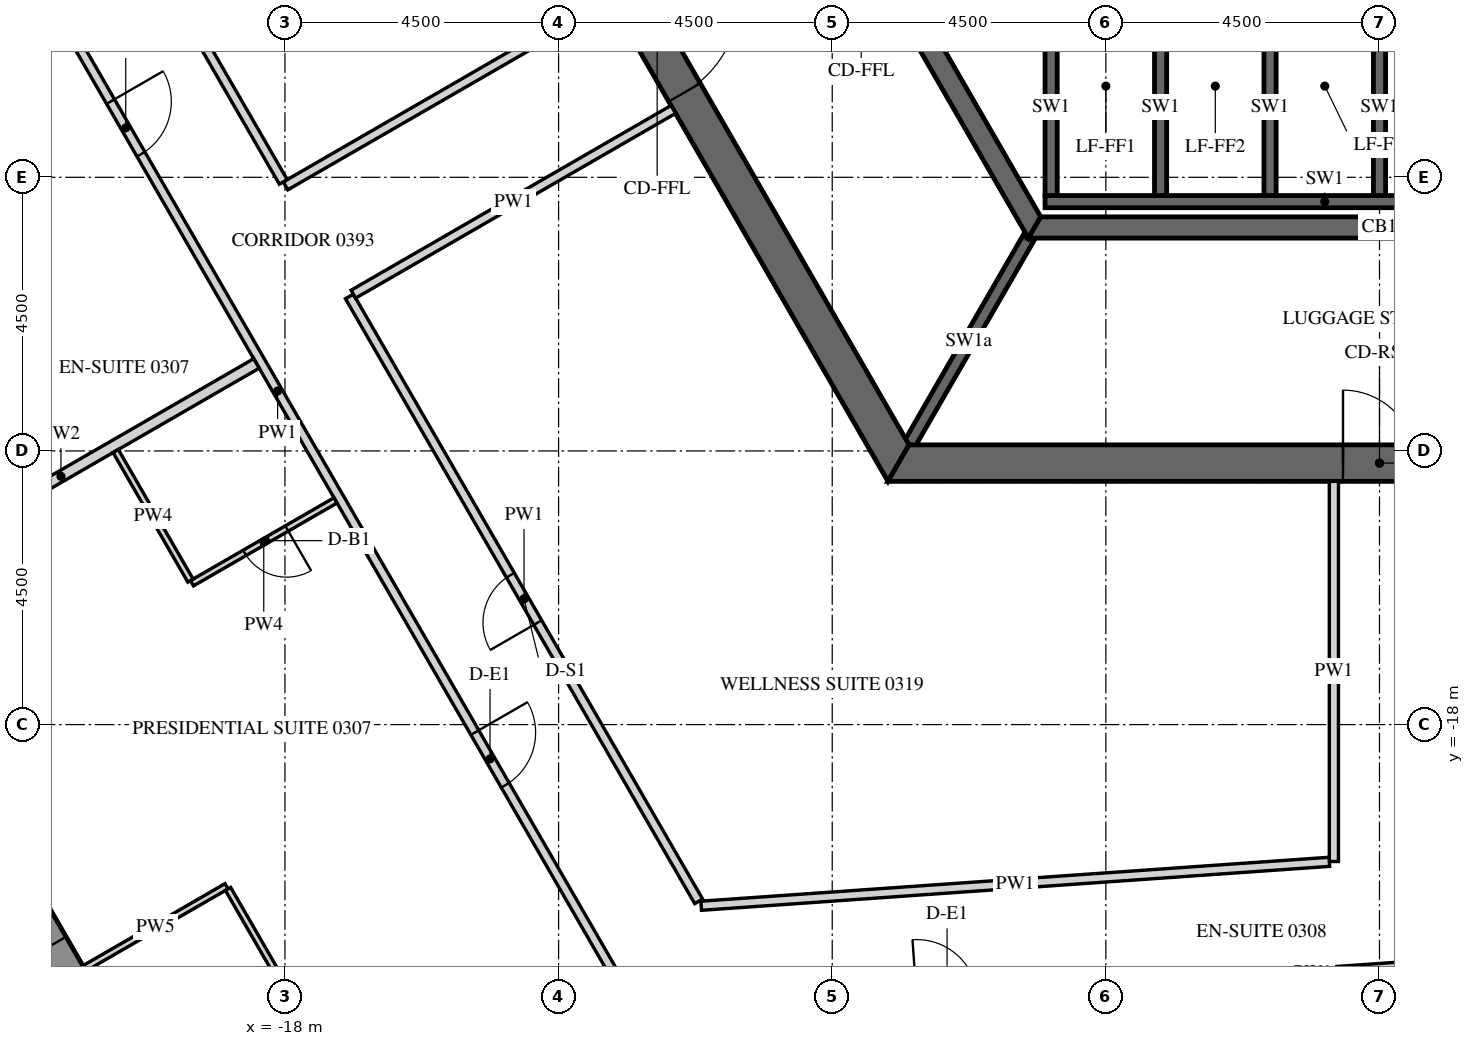
"""IFC4 building model, lengths in metres.
Left out: names, types, materials, properties, quantities, classifications, styles, units other than length and angle.
Written with IfcOpenShell. Run it as: python <this file> out.ifc"""

import sys

from ifc_helpers import new_model, si_unit, direction, frame, frame_2d, origin, place, context, subcontext, project, spatial, polyline, rectangle, outline, extrude, element, fill, save


model = new_model("IFC4")
c1 = context("Model", 3, precision=1e-05, world=origin(), true_north=direction((0.0, 1.0)))
c2 = subcontext(c1, "Body", "Model", "MODEL_VIEW")
j1 = project(units=[si_unit("LENGTHUNIT", "METRE"), si_unit("PLANEANGLEUNIT", "RADIAN")], contexts=[c1])
p1 = place(None, origin())
s1 = spatial("IfcSite", under=j1, at=p1, CompositionType="ELEMENT")
p2 = place(p1, origin())
s2 = spatial("IfcBuilding", under=s1, at=p2, CompositionType="ELEMENT")
p3 = place(p2, frame((0.0, 0.0, 60.9)))
s3 = spatial("IfcBuildingStorey", under=s2, at=p3, CompositionType="ELEMENT", Elevation=60.9)
p4 = place(p3, frame((-32.655, -2.89, -0.15), z_axis=(0.0, 0.0, 1.0), x_axis=(0.499997711317, -0.866026725152, 0.0)))
e1 = element("IfcWall", 1, at=p4, inside=s3, PredefinedType="SOLIDWALL", context=c2, shape_type="SweptSolid", body=[
    extrude(outline(polyline([(-0.022, -0.275), (30.097, -0.275), (30.045, 0.275), (0.022, 0.275), (-0.022, -0.275)])), origin(), (0.0, 0.0, 1.0), 3.9),
])
p5 = place(p4, frame((1.236, 0.0, 1.05)))
e2 = element("IfcOpeningElement", 2, at=p5, cuts=e1, PredefinedType="OPENING", context=c2, shape_type="SweptSolid", body=[
    extrude(rectangle(XDim=2.4, YDim=2.4, at=frame_2d((1.2, 1.2))), frame((0.0, 0.285, 0.0), z_axis=(0.0, -1.0, 0.0), x_axis=(1.0, 0.0, 0.0)), (0.0, 0.0, 1.0), 0.57),
])
p6 = place(p4, frame((4.835, 0.0, 1.05)))
e3 = element("IfcOpeningElement", 3, at=p6, cuts=e1, PredefinedType="OPENING", context=c2, shape_type="SweptSolid", body=[
    extrude(rectangle(XDim=2.4, YDim=2.4, at=frame_2d((1.2, 1.2))), frame((0.0, 0.285, 0.0), z_axis=(0.0, -1.0, 0.0), x_axis=(1.0, 0.0, 0.0)), (0.0, 0.0, 1.0), 0.57),
])
p7 = place(p4, frame((8.436, 0.0, 1.05)))
e4 = element("IfcOpeningElement", 4, at=p7, cuts=e1, PredefinedType="OPENING", context=c2, shape_type="SweptSolid", body=[
    extrude(rectangle(XDim=2.4, YDim=2.4, at=frame_2d((1.2, 1.2))), frame((0.0, 0.285, 0.0), z_axis=(0.0, -1.0, 0.0), x_axis=(1.0, 0.0, 0.0)), (0.0, 0.0, 1.0), 0.57),
])
p8 = place(p4, frame((12.035, 0.0, 1.05)))
e5 = element("IfcOpeningElement", 5, at=p8, cuts=e1, PredefinedType="OPENING", context=c2, shape_type="SweptSolid", body=[
    extrude(rectangle(XDim=2.4, YDim=2.4, at=frame_2d((1.2, 1.2))), frame((0.0, 0.285, 0.0), z_axis=(0.0, -1.0, 0.0), x_axis=(1.0, 0.0, 0.0)), (0.0, 0.0, 1.0), 0.57),
])
p9 = place(p4, frame((15.635, 0.0, 1.05)))
e6 = element("IfcOpeningElement", 6, at=p9, cuts=e1, PredefinedType="OPENING", context=c2, shape_type="SweptSolid", body=[
    extrude(rectangle(XDim=2.4, YDim=2.4, at=frame_2d((1.2, 1.2))), frame((0.0, 0.285, 0.0), z_axis=(0.0, -1.0, 0.0), x_axis=(1.0, 0.0, 0.0)), (0.0, 0.0, 1.0), 0.57),
])
p10 = place(p4, frame((19.236, 0.0, 1.05)))
e7 = element("IfcOpeningElement", 7, at=p10, cuts=e1, PredefinedType="OPENING", context=c2, shape_type="SweptSolid", body=[
    extrude(rectangle(XDim=2.4, YDim=2.4, at=frame_2d((1.2, 1.2))), frame((0.0, 0.285, 0.0), z_axis=(0.0, -1.0, 0.0), x_axis=(1.0, 0.0, 0.0)), (0.0, 0.0, 1.0), 0.57),
])
p11 = place(p4, frame((22.835, 0.0, 1.05)))
e8 = element("IfcOpeningElement", 8, at=p11, cuts=e1, PredefinedType="OPENING", context=c2, shape_type="SweptSolid", body=[
    extrude(rectangle(XDim=2.4, YDim=2.4, at=frame_2d((1.2, 1.2))), frame((0.0, 0.285, 0.0), z_axis=(0.0, -1.0, 0.0), x_axis=(1.0, 0.0, 0.0)), (0.0, 0.0, 1.0), 0.57),
])
p12 = place(p4, frame((26.436, 0.0, 1.05)))
e9 = element("IfcOpeningElement", 9, at=p12, cuts=e1, PredefinedType="OPENING", context=c2, shape_type="SweptSolid", body=[
    extrude(rectangle(XDim=2.4, YDim=2.4, at=frame_2d((1.2, 1.2))), frame((0.0, 0.285, 0.0), z_axis=(0.0, -1.0, 0.0), x_axis=(1.0, 0.0, 0.0)), (0.0, 0.0, 1.0), 0.57),
])
p13 = place(p3, frame((-15.819, 0.0, -0.15), z_axis=(0.0, 0.0, 1.0), x_axis=(0.499999880136, -0.866025472988, 0.0)))
e10 = element("IfcWall", 10, at=p13, inside=s3, PredefinedType="SHEAR", context=c2, shape_type="SweptSolid", body=[
    extrude(outline(polyline([(-0.173, -0.3), (15.993, -0.3), (15.646, 0.3), (0.173, 0.3), (-0.173, -0.3)])), origin(), (0.0, 0.0, 1.0), 3.9),
])
p14 = place(p13, frame((6.981, 0.0, 0.15)))
e11 = element("IfcOpeningElement", 11, at=p14, cuts=e10, PredefinedType="OPENING", context=c2, shape_type="SweptSolid", body=[
    extrude(rectangle(XDim=1.8, YDim=2.4, at=frame_2d((0.9, 1.2))), frame((0.0, 0.31, 0.0), z_axis=(0.0, -1.0, 0.0), x_axis=(1.0, 0.0, 0.0)), (0.0, 0.0, 1.0), 0.62),
])
p15 = place(p3, frame((-7.91, -13.7, -0.15), z_axis=(0.0, 0.0, 1.0), x_axis=(1.0, 0.0, 0.0)))
e12 = element("IfcWall", 12, at=p15, inside=s3, PredefinedType="SHEAR", context=c2, shape_type="SweptSolid", body=[
    extrude(outline(polyline([(-0.173, -0.3), (15.993, -0.3), (15.646, 0.3), (0.173, 0.3), (-0.173, -0.3)])), origin(), (0.0, 0.0, 1.0), 3.9),
])
p16 = place(p15, frame((7.31, 0.0, 0.15)))
e13 = element("IfcOpeningElement", 13, at=p16, cuts=e12, PredefinedType="OPENING", context=c2, shape_type="SweptSolid", body=[
    extrude(rectangle(XDim=1.2, YDim=2.4, at=frame_2d((0.6, 1.2))), frame((0.0, 0.31, 0.0), z_axis=(0.0, -1.0, 0.0), x_axis=(1.0, 0.0, 0.0)), (0.0, 0.0, 1.0), 0.62),
])
p17 = place(p3, frame((-11.345, 0.0, -0.15), z_axis=(0.0, 0.0, 1.0), x_axis=(0.499995046907, -0.866028263435, 0.0)))
e14 = element("IfcWall", 14, at=p17, inside=s3, PredefinedType="SHEAR", context=c2, shape_type="SweptSolid", body=[
    extrude(outline(polyline([(-0.101, -0.175), (11.446, -0.175), (11.244, 0.175), (0.101, 0.175), (-0.101, -0.175)])), origin(), (0.0, 0.0, 1.0), 3.9),
])
p18 = place(p17, frame((4.744, 0.0, 0.15)))
e15 = element("IfcOpeningElement", 15, at=p18, cuts=e14, PredefinedType="OPENING", context=c2, shape_type="SweptSolid", body=[
    extrude(rectangle(XDim=1.8, YDim=2.4, at=frame_2d((0.9, 1.2))), frame((0.0, 0.185, 0.0), z_axis=(0.0, -1.0, 0.0), x_axis=(1.0, 0.0, 0.0)), (0.0, 0.0, 1.0), 0.37),
])
p19 = place(p3, frame((-5.673, -9.825, -0.15), z_axis=(0.0, 0.0, 1.0), x_axis=(1.0, 0.0, 0.0)))
e16 = element("IfcWall", 16, at=p19, inside=s3, PredefinedType="SHEAR", context=c2, shape_type="SweptSolid", body=[
    extrude(outline(polyline([(-0.101, -0.175), (11.446, -0.175), (11.244, 0.175), (0.101, 0.175), (-0.101, -0.175)])), origin(), (0.0, 0.0, 1.0), 3.9),
])
p20 = place(p3, frame((-5.5, -9.4, -0.25), z_axis=(0.0, 0.0, 1.0), x_axis=(1.0, 0.0, 0.0)))
e17 = element("IfcWall", 17, at=p20, inside=s3, PredefinedType="SHEAR", context=c2, shape_type="SweptSolid", body=[
    extrude(rectangle(XDim=9.2, YDim=0.2, at=frame_2d((4.6, 0.0))), origin(), (0.0, 0.0, 1.0), 3.9),
])
for number, where, z_axis, x_axis in (
    (18, (-5.4, -9.3, -0.25), (0.0, 0.0, 1.0), (0.0, 1.0, 0.0)),
    (19, (-3.6, -9.3, -0.25), (0.0, 0.0, 1.0), (0.0, 1.0, 0.0)),
    (20, (-1.8, -9.3, -0.25), (0.0, 0.0, 1.0), (0.0, 1.0, 0.0)),
    (21, (0.0, -9.3, -0.25), (0.0, 0.0, 1.0), (0.0, 1.0, 0.0)),
):
    element("IfcWall", number, at=place(p3, frame(where, z_axis=z_axis, x_axis=x_axis)), inside=s3, PredefinedType="SHEAR", context=c2, shape_type="SweptSolid", body=[
        extrude(rectangle(XDim=2.9, YDim=0.2, at=frame_2d((1.45, 0.0))), origin(), (0.0, 0.0, 1.0), 3.9),
    ])
p21 = place(p3, frame((-5.773, -10.0, -0.15), z_axis=(0.0, 0.0, 1.0), x_axis=(-0.500038251005, -0.86600331843, 0.0)))
e22 = element("IfcWall", 22, at=p21, inside=s3, PredefinedType="SHEAR", context=c2, shape_type="SweptSolid", body=[
    extrude(rectangle(XDim=3.926, YDim=0.2, at=frame_2d((1.963, 0.0))), origin(), (0.0, 0.0, 1.0), 3.9),
])
p22 = place(p3, frame((-24.09, -2.175, 0.0), z_axis=(0.0, 0.0, 1.0), x_axis=(0.499996832073, -0.86602723278, 0.0)))
e23 = element("IfcWall", 23, at=p22, inside=s3, PredefinedType="PARTITIONING", context=c2, shape_type="SweptSolid", body=[
    extrude(rectangle(XDim=23.877, YDim=0.15, at=frame_2d((11.938, 0.0))), origin(), (0.0, 0.0, 1.0), 2.988),
])
p23 = place(p22, frame((6.443, 0.0, 0.0)))
e24 = element("IfcOpeningElement", 24, at=p23, cuts=e23, PredefinedType="OPENING", context=c2, shape_type="SweptSolid", body=[
    extrude(rectangle(XDim=1.0, YDim=2.1, at=frame_2d((0.5, 1.05))), frame((0.0, 0.085, 0.0), z_axis=(0.0, -1.0, 0.0), x_axis=(1.0, 0.0, 0.0)), (0.0, 0.0, 1.0), 0.17),
])
p24 = place(p22, frame((18.425, 0.0, 0.0)))
e25 = element("IfcOpeningElement", 25, at=p24, cuts=e23, PredefinedType="OPENING", context=c2, shape_type="SweptSolid", body=[
    extrude(rectangle(XDim=1.0, YDim=2.1, at=frame_2d((0.5, 1.05))), frame((0.0, 0.085, 0.0), z_axis=(0.0, -1.0, 0.0), x_axis=(1.0, 0.0, 0.0)), (0.0, 0.0, 1.0), 0.17),
])
p25 = place(p3, frame((-12.068, -22.847, 0.0), z_axis=(0.0, 0.0, 1.0), x_axis=(0.99756437486, 0.069751831595, 0.0)))
e26 = element("IfcWall", 26, at=p25, inside=s3, PredefinedType="PARTITIONING", context=c2, shape_type="SweptSolid", body=[
    extrude(rectangle(XDim=22.002, YDim=0.15, at=frame_2d((11.001, 0.0))), origin(), (0.0, 0.0, 1.0), 2.988),
])
p26 = place(p25, frame((4.469, 0.0, 0.0)))
e27 = element("IfcOpeningElement", 27, at=p26, cuts=e26, PredefinedType="OPENING", context=c2, shape_type="SweptSolid", body=[
    extrude(rectangle(XDim=1.0, YDim=2.1, at=frame_2d((0.5, 1.05))), frame((0.0, 0.085, 0.0), z_axis=(0.0, -1.0, 0.0), x_axis=(1.0, 0.0, 0.0)), (0.0, 0.0, 1.0), 0.17),
])
p27 = place(p25, frame((17.912, 0.0, 0.0)))
e28 = element("IfcOpeningElement", 28, at=p27, cuts=e26, PredefinedType="OPENING", context=c2, shape_type="SweptSolid", body=[
    extrude(rectangle(XDim=1.0, YDim=2.1, at=frame_2d((0.5, 1.05))), frame((0.0, 0.085, 0.0), z_axis=(0.0, -1.0, 0.0), x_axis=(1.0, 0.0, 0.0)), (0.0, 0.0, 1.0), 0.17),
])
p28 = place(p3, frame((-12.664, -6.066, 0.0), z_axis=(0.0, 0.0, 1.0), x_axis=(-0.866023618125, -0.500003092839, 0.0)))
e29 = element("IfcWall", 29, at=p28, inside=s3, PredefinedType="PARTITIONING", context=c2, shape_type="SweptSolid", body=[
    extrude(rectangle(XDim=6.15, YDim=0.15, at=frame_2d((3.075, 0.0))), origin(), (0.0, 0.0, 1.0), 2.988),
])
p29 = place(p3, frame((-18.027, -9.076, 0.0), z_axis=(0.0, 0.0, 1.0), x_axis=(-0.500007318041, 0.86602117867, 0.0)))
e30 = element("IfcWall", 30, at=p29, inside=s3, PredefinedType="PARTITIONING", context=c2, shape_type="SweptSolid", body=[
    extrude(rectangle(XDim=8.383, YDim=0.15, at=frame_2d((4.191, 0.0))), origin(), (0.0, 0.0, 1.0), 2.988),
])
p30 = place(p29, frame((3.742, 0.0, 0.0)))
e31 = element("IfcOpeningElement", 31, at=p30, cuts=e30, PredefinedType="OPENING", context=c2, shape_type="SweptSolid", body=[
    extrude(rectangle(XDim=0.9, YDim=2.1, at=frame_2d((0.45, 1.05))), frame((0.0, 0.085, 0.0), z_axis=(0.0, -1.0, 0.0), x_axis=(1.0, 0.0, 0.0)), (0.0, 0.0, 1.0), 0.17),
])
p31 = place(p3, frame((-0.75, -14.0, 0.0), z_axis=(0.0, 0.0, 1.0), x_axis=(0.0, -1.0, 0.0)))
e32 = element("IfcWall", 32, at=p31, inside=s3, PredefinedType="PARTITIONING", context=c2, shape_type="SweptSolid", body=[
    extrude(rectangle(XDim=6.252, YDim=0.15, at=frame_2d((3.126, 0.0))), origin(), (0.0, 0.0, 1.0), 2.988),
])
p32 = place(p3, frame((-0.825, -20.257, 0.0), z_axis=(0.0, 0.0, 1.0), x_axis=(-0.9975635143, -0.069764137903, 0.0)))
e33 = element("IfcWall", 33, at=p32, inside=s3, PredefinedType="PARTITIONING", context=c2, shape_type="SweptSolid", body=[
    extrude(rectangle(XDim=10.355, YDim=0.15, at=frame_2d((5.177, 0.0))), origin(), (0.0, 0.0, 1.0), 2.988),
])
p33 = place(p3, frame((-11.197, -20.907, 0.0), z_axis=(0.0, 0.0, 1.0), x_axis=(-0.500004557924, 0.86602277225, 0.0)))
e34 = element("IfcWall", 34, at=p33, inside=s3, PredefinedType="PARTITIONING", context=c2, shape_type="SweptSolid", body=[
    extrude(rectangle(XDim=11.487, YDim=0.15, at=frame_2d((5.743, 0.0))), origin(), (0.0, 0.0, 1.0), 2.988),
])
p34 = place(p33, frame((5.293, 0.0, 0.0)))
e35 = element("IfcOpeningElement", 35, at=p34, cuts=e34, PredefinedType="OPENING", context=c2, shape_type="SweptSolid", body=[
    extrude(rectangle(XDim=0.9, YDim=2.1, at=frame_2d((0.45, 1.05))), frame((0.0, 0.085, 0.0), z_axis=(0.0, -1.0, 0.0), x_axis=(1.0, 0.0, 0.0)), (0.0, 0.0, 1.0), 0.17),
])
p35 = place(p3, frame((-16.875, -10.922, 0.0), z_axis=(0.0, 0.0, 1.0), x_axis=(0.866023634079, 0.500003065207, 0.0)))
e36 = element("IfcWall", 36, at=p35, inside=s3, PredefinedType="PARTITIONING", context=c2, shape_type="SweptSolid", body=[
    extrude(rectangle(XDim=6.075, YDim=0.15, at=frame_2d((3.038, 0.0))), origin(), (0.0, 0.0, 1.0), 2.988),
])
p36 = place(p3, frame((-24.899, -15.774, 0.0), z_axis=(0.0, 0.0, 1.0), x_axis=(0.866028983062, 0.499993800457, 0.0)))
e37 = element("IfcWall", 37, at=p36, inside=s3, PredefinedType="PARTITIONING", context=c2, shape_type="SweptSolid", body=[
    extrude(rectangle(XDim=7.425, YDim=0.18, at=frame_2d((3.712, 0.0))), origin(), (0.0, 0.0, 1.0), 2.988),
])
p37 = place(p3, frame((-17.169, -14.313, 0.0), z_axis=(0.0, 0.0, 1.0), x_axis=(-0.866012511928, -0.500022328685, 0.0)))
e38 = element("IfcWall", 38, at=p37, inside=s3, PredefinedType="PARTITIONING", context=c2, shape_type="SweptSolid", body=[
    extrude(rectangle(XDim=2.725, YDim=0.1, at=frame_2d((1.363, 0.0))), origin(), (0.0, 0.0, 1.0), 2.988),
])
p38 = place(p37, frame((0.925, 0.0, 0.0)))
e39 = element("IfcOpeningElement", 39, at=p38, cuts=e38, PredefinedType="OPENING", context=c2, shape_type="SweptSolid", body=[
    extrude(rectangle(XDim=0.8, YDim=2.1, at=frame_2d((0.4, 1.05))), frame((0.0, 0.06, 0.0), z_axis=(0.0, -1.0, 0.0), x_axis=(1.0, 0.0, 0.0)), (0.0, 0.0, 1.0), 0.12),
])
p39 = place(p3, frame((-19.554, -15.632, 0.0), z_axis=(0.0, 0.0, 1.0), x_axis=(-0.500003092839, 0.866023618125, 0.0)))
e40 = element("IfcWall", 40, at=p39, inside=s3, PredefinedType="PARTITIONING", context=c2, shape_type="SweptSolid", body=[
    extrude(rectangle(XDim=2.46, YDim=0.1, at=frame_2d((1.23, 0.0))), origin(), (0.0, 0.0, 1.0), 2.988),
])
p40 = place(p3, frame((-21.299, -22.009, 0.0), z_axis=(0.0, 0.0, 1.0), x_axis=(0.86599734893, 0.500048589285, 0.0)))
e41 = element("IfcWall", 41, at=p40, inside=s3, PredefinedType="PARTITIONING", context=c2, shape_type="SweptSolid", body=[
    extrude(rectangle(XDim=2.7, YDim=0.1, at=frame_2d((1.35, 0.0))), origin(), (0.0, 0.0, 1.0), 2.988),
])
p41 = place(p3, frame((-18.936, -20.702, 0.0), z_axis=(0.0, 0.0, 1.0), x_axis=(0.49998354646, -0.866034903032, 0.0)))
e42 = element("IfcWall", 42, at=p41, inside=s3, PredefinedType="PARTITIONING", context=c2, shape_type="SweptSolid", body=[
    extrude(rectangle(XDim=8.148, YDim=0.1, at=frame_2d((4.074, 0.0))), origin(), (0.0, 0.0, 1.0), 2.988),
])
p42 = place(p41, frame((3.1, 0.0, 0.0)))
e43 = element("IfcOpeningElement", 43, at=p42, cuts=e42, PredefinedType="OPENING", context=c2, shape_type="SweptSolid", body=[
    extrude(rectangle(XDim=0.9, YDim=2.1, at=frame_2d((0.45, 1.05))), frame((0.0, 0.06, 0.0), z_axis=(0.0, -1.0, 0.0), x_axis=(1.0, 0.0, 0.0)), (0.0, 0.0, 1.0), 0.12),
])
p43 = place(p10, frame((0.0, 0.205, 0.0)))
e44 = element("IfcWindow", 44, at=p43, inside=s3, PartitioningType="DOUBLE_PANEL_VERTICAL", PredefinedType="WINDOW", context=c2, shape_type="SweptSolid", body=[
    extrude(rectangle(XDim=2.4, YDim=2.4, at=frame_2d((1.2, 1.2))), frame((0.0, 0.03, 0.0), z_axis=(0.0, -1.0, 0.0), x_axis=(1.0, 0.0, 0.0)), (0.0, 0.0, 1.0), 0.06),
])
fill(e7, e44)
p44 = place(p14, origin())
e45 = element("IfcDoor", 45, at=p44, inside=s3, OperationType="DOUBLE_DOOR_SINGLE_SWING", PredefinedType="DOOR", context=c2, shape_type="SweptSolid", body=[
    extrude(rectangle(XDim=1.8, YDim=2.4, at=frame_2d((0.9, 1.2))), frame((0.0, 0.025, 0.0), z_axis=(0.0, -1.0, 0.0), x_axis=(1.0, 0.0, 0.0)), (0.0, 0.0, 1.0), 0.05),
])
fill(e11, e45)
p45 = place(p16, origin())
e46 = element("IfcDoor", 46, at=p45, inside=s3, OperationType="SINGLE_SWING_LEFT", PredefinedType="DOOR", context=c2, shape_type="SweptSolid", body=[
    extrude(rectangle(XDim=1.2, YDim=2.4, at=frame_2d((0.6, 1.2))), frame((0.0, 0.025, 0.0), z_axis=(0.0, -1.0, 0.0), x_axis=(1.0, 0.0, 0.0)), (0.0, 0.0, 1.0), 0.05),
])
fill(e13, e46)
p46 = place(p23, origin())
e47 = element("IfcDoor", 47, at=p46, inside=s3, OperationType="SINGLE_SWING_LEFT", PredefinedType="DOOR", context=c2, shape_type="SweptSolid", body=[
    extrude(rectangle(XDim=1.0, YDim=2.1, at=frame_2d((0.5, 1.05))), frame((0.0, 0.025, 0.0), z_axis=(0.0, -1.0, 0.0), x_axis=(1.0, 0.0, 0.0)), (0.0, 0.0, 1.0), 0.05),
])
fill(e24, e47)
p47 = place(p24, origin())
e48 = element("IfcDoor", 48, at=p47, inside=s3, OperationType="SINGLE_SWING_LEFT", PredefinedType="DOOR", context=c2, shape_type="SweptSolid", body=[
    extrude(rectangle(XDim=1.0, YDim=2.1, at=frame_2d((0.5, 1.05))), frame((0.0, 0.025, 0.0), z_axis=(0.0, -1.0, 0.0), x_axis=(1.0, 0.0, 0.0)), (0.0, 0.0, 1.0), 0.05),
])
fill(e25, e48)
p48 = place(p38, origin())
e49 = element("IfcDoor", 49, at=p48, inside=s3, OperationType="SINGLE_SWING_RIGHT", PredefinedType="DOOR", context=c2, shape_type="SweptSolid", body=[
    extrude(rectangle(XDim=0.8, YDim=2.1, at=frame_2d((0.4, 1.05))), frame((0.0, 0.025, 0.0), z_axis=(0.0, -1.0, 0.0), x_axis=(1.0, 0.0, 0.0)), (0.0, 0.0, 1.0), 0.05),
])
fill(e39, e49)
p49 = place(p34, origin())
e50 = element("IfcDoor", 50, at=p49, inside=s3, OperationType="SINGLE_SWING_RIGHT", PredefinedType="DOOR", context=c2, shape_type="SweptSolid", body=[
    extrude(rectangle(XDim=0.9, YDim=2.1, at=frame_2d((0.45, 1.05))), frame((0.0, 0.025, 0.0), z_axis=(0.0, -1.0, 0.0), x_axis=(1.0, 0.0, 0.0)), (0.0, 0.0, 1.0), 0.05),
])
fill(e35, e50)
save(model, sys.argv[1])
